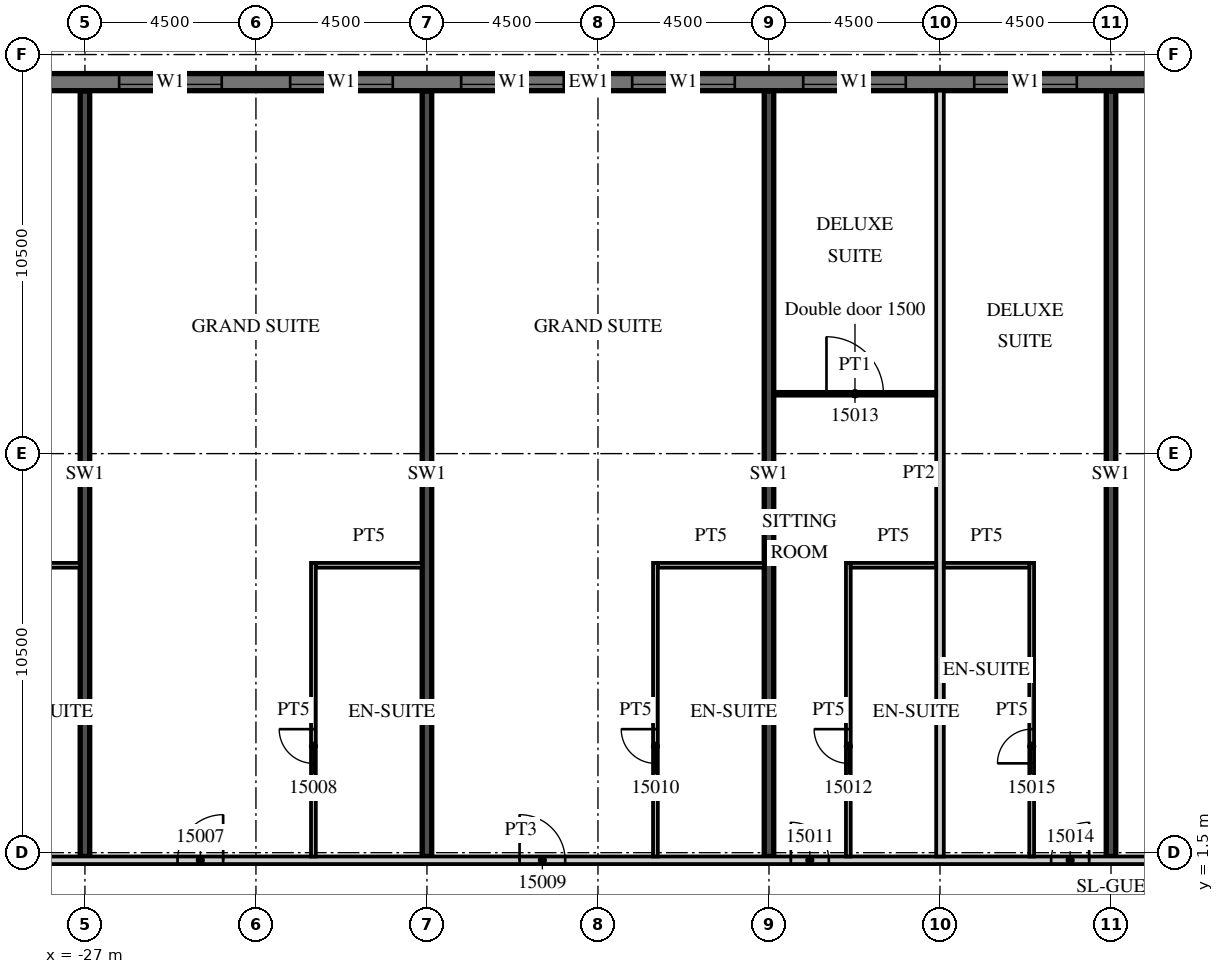
"""IFC4 building model, lengths in metres.
Left out: names, types, materials, properties, quantities, classifications, styles, units other than length and angle.
Written with IfcOpenShell. Run it as: python <this file> out.ifc"""

import sys

from ifc_helpers import new_model, si_unit, direction, frame, frame_2d, origin, place, context, subcontext, project, spatial, rectangle, extrude, element, fill, save


model = new_model("IFC4")
c1 = context("Model", 3, precision=1e-05, world=origin(), true_north=direction((0.0, 1.0)))
c2 = subcontext(c1, "Body", "Model", "MODEL_VIEW")
j1 = project(units=[si_unit("LENGTHUNIT", "METRE"), si_unit("PLANEANGLEUNIT", "RADIAN")], contexts=[c1])
p1 = place(None, origin())
s1 = spatial("IfcSite", under=j1, at=p1, CompositionType="ELEMENT")
p2 = place(p1, origin())
s2 = spatial("IfcBuilding", under=s1, at=p2, CompositionType="ELEMENT")
p3 = place(p2, frame((0.0, 0.0, 79.8)))
s3 = spatial("IfcBuildingStorey", under=s2, at=p3, CompositionType="ELEMENT", Elevation=79.8)
for number, where, z_axis, x_axis in (
    (1, (-27.0, 1.4, 0.0), (0.0, 0.0, 1.0), (0.0, 1.0, 0.0)),
    (2, (-18.0, 1.4, 0.0), (0.0, 0.0, 1.0), (0.0, 1.0, 0.0)),
    (3, (-9.0, 1.4, 0.0), (0.0, 0.0, 1.0), (0.0, 1.0, 0.0)),
    (4, (0.0, 1.4, 0.0), (0.0, 0.0, 1.0), (0.0, 1.0, 0.0)),
):
    element("IfcWall", number, at=place(p3, frame(where, z_axis=z_axis, x_axis=x_axis)), inside=s3, PredefinedType="SHEAR", context=c2, shape_type="SweptSolid", body=[
        extrude(rectangle(XDim=20.14, YDim=0.25, at=frame_2d((10.07, 0.0))), origin(), (0.0, 0.0, 1.0), 3.3),
    ])
p4 = place(p3, frame((13.5, 21.775, 0.0), z_axis=(0.0, 0.0, 1.0), x_axis=(-1.0, 0.0, 0.0)))
e5 = element("IfcWall", 5, at=p4, inside=s3, PredefinedType="SOLIDWALL", context=c2, shape_type="SweptSolid", body=[
    extrude(rectangle(XDim=54.5, YDim=0.45, at=frame_2d((27.25, 0.0))), origin(), (0.0, 0.0, 1.0), 3.02),
])
p5 = place(p4, frame((0.9, 0.0, 0.45)))
e6 = element("IfcOpeningElement", 6, at=p5, cuts=e5, PredefinedType="OPENING", context=c2, shape_type="SweptSolid", body=[
    extrude(rectangle(XDim=2.7, YDim=2.25, at=frame_2d((1.35, 1.125))), frame((0.0, 0.235, 0.0), z_axis=(0.0, -1.0, 0.0), x_axis=(1.0, 0.0, 0.0)), (0.0, 0.0, 1.0), 0.47),
])
p6 = place(p4, frame((5.4, 0.0, 0.45)))
e7 = element("IfcOpeningElement", 7, at=p6, cuts=e5, PredefinedType="OPENING", context=c2, shape_type="SweptSolid", body=[
    extrude(rectangle(XDim=2.7, YDim=2.25, at=frame_2d((1.35, 1.125))), frame((0.0, 0.235, 0.0), z_axis=(0.0, -1.0, 0.0), x_axis=(1.0, 0.0, 0.0)), (0.0, 0.0, 1.0), 0.47),
])
p7 = place(p4, frame((9.9, 0.0, 0.45)))
e8 = element("IfcOpeningElement", 8, at=p7, cuts=e5, PredefinedType="OPENING", context=c2, shape_type="SweptSolid", body=[
    extrude(rectangle(XDim=2.7, YDim=2.25, at=frame_2d((1.35, 1.125))), frame((0.0, 0.235, 0.0), z_axis=(0.0, -1.0, 0.0), x_axis=(1.0, 0.0, 0.0)), (0.0, 0.0, 1.0), 0.47),
])
p8 = place(p4, frame((14.4, 0.0, 0.45)))
e9 = element("IfcOpeningElement", 9, at=p8, cuts=e5, PredefinedType="OPENING", context=c2, shape_type="SweptSolid", body=[
    extrude(rectangle(XDim=2.7, YDim=2.25, at=frame_2d((1.35, 1.125))), frame((0.0, 0.235, 0.0), z_axis=(0.0, -1.0, 0.0), x_axis=(1.0, 0.0, 0.0)), (0.0, 0.0, 1.0), 0.47),
])
p9 = place(p4, frame((18.9, 0.0, 0.45)))
e10 = element("IfcOpeningElement", 10, at=p9, cuts=e5, PredefinedType="OPENING", context=c2, shape_type="SweptSolid", body=[
    extrude(rectangle(XDim=2.7, YDim=2.25, at=frame_2d((1.35, 1.125))), frame((0.0, 0.235, 0.0), z_axis=(0.0, -1.0, 0.0), x_axis=(1.0, 0.0, 0.0)), (0.0, 0.0, 1.0), 0.47),
])
p10 = place(p4, frame((23.4, 0.0, 0.45)))
e11 = element("IfcOpeningElement", 11, at=p10, cuts=e5, PredefinedType="OPENING", context=c2, shape_type="SweptSolid", body=[
    extrude(rectangle(XDim=2.7, YDim=2.25, at=frame_2d((1.35, 1.125))), frame((0.0, 0.235, 0.0), z_axis=(0.0, -1.0, 0.0), x_axis=(1.0, 0.0, 0.0)), (0.0, 0.0, 1.0), 0.47),
])
p11 = place(p4, frame((27.9, 0.0, 0.45)))
e12 = element("IfcOpeningElement", 12, at=p11, cuts=e5, PredefinedType="OPENING", context=c2, shape_type="SweptSolid", body=[
    extrude(rectangle(XDim=2.7, YDim=2.25, at=frame_2d((1.35, 1.125))), frame((0.0, 0.235, 0.0), z_axis=(0.0, -1.0, 0.0), x_axis=(1.0, 0.0, 0.0)), (0.0, 0.0, 1.0), 0.47),
])
p12 = place(p4, frame((32.4, 0.0, 0.45)))
e13 = element("IfcOpeningElement", 13, at=p12, cuts=e5, PredefinedType="OPENING", context=c2, shape_type="SweptSolid", body=[
    extrude(rectangle(XDim=2.7, YDim=2.25, at=frame_2d((1.35, 1.125))), frame((0.0, 0.235, 0.0), z_axis=(0.0, -1.0, 0.0), x_axis=(1.0, 0.0, 0.0)), (0.0, 0.0, 1.0), 0.47),
])
p13 = place(p4, frame((36.9, 0.0, 0.45)))
e14 = element("IfcOpeningElement", 14, at=p13, cuts=e5, PredefinedType="OPENING", context=c2, shape_type="SweptSolid", body=[
    extrude(rectangle(XDim=2.7, YDim=2.25, at=frame_2d((1.35, 1.125))), frame((0.0, 0.235, 0.0), z_axis=(0.0, -1.0, 0.0), x_axis=(1.0, 0.0, 0.0)), (0.0, 0.0, 1.0), 0.47),
])
p14 = place(p4, frame((41.4, 0.0, 0.45)))
e15 = element("IfcOpeningElement", 15, at=p14, cuts=e5, PredefinedType="OPENING", context=c2, shape_type="SweptSolid", body=[
    extrude(rectangle(XDim=2.7, YDim=2.25, at=frame_2d((1.35, 1.125))), frame((0.0, 0.235, 0.0), z_axis=(0.0, -1.0, 0.0), x_axis=(1.0, 0.0, 0.0)), (0.0, 0.0, 1.0), 0.47),
])
p15 = place(p4, frame((45.9, 0.0, 0.45)))
e16 = element("IfcOpeningElement", 16, at=p15, cuts=e5, PredefinedType="OPENING", context=c2, shape_type="SweptSolid", body=[
    extrude(rectangle(XDim=2.7, YDim=2.25, at=frame_2d((1.35, 1.125))), frame((0.0, 0.235, 0.0), z_axis=(0.0, -1.0, 0.0), x_axis=(1.0, 0.0, 0.0)), (0.0, 0.0, 1.0), 0.47),
])
p16 = place(p4, frame((50.4, 0.0, 0.45)))
e17 = element("IfcOpeningElement", 17, at=p16, cuts=e5, PredefinedType="OPENING", context=c2, shape_type="SweptSolid", body=[
    extrude(rectangle(XDim=2.7, YDim=2.25, at=frame_2d((1.35, 1.125))), frame((0.0, 0.235, 0.0), z_axis=(0.0, -1.0, 0.0), x_axis=(1.0, 0.0, 0.0)), (0.0, 0.0, 1.0), 0.47),
])
p17 = place(p3, frame((-44.55, 1.3, 0.0), z_axis=(0.0, 0.0, 1.0), x_axis=(1.0, 0.0, 0.0)))
e18 = element("IfcWall", 18, at=p17, inside=s3, PredefinedType="PARTITIONING", context=c2, shape_type="SweptSolid", body=[
    extrude(rectangle(XDim=58.05, YDim=0.2, at=frame_2d((29.025, 0.0))), origin(), (0.0, 0.0, 1.0), 3.02),
])
p18 = place(p17, frame((0.525, 0.0, 0.0)))
e19 = element("IfcOpeningElement", 19, at=p18, cuts=e18, PredefinedType="OPENING", context=c2, shape_type="SweptSolid", body=[
    extrude(rectangle(XDim=1.0, YDim=2.1, at=frame_2d((0.5, 1.05))), frame((0.0, 0.11, 0.0), z_axis=(0.0, -1.0, 0.0), x_axis=(1.0, 0.0, 0.0)), (0.0, 0.0, 1.0), 0.22),
])
p19 = place(p17, frame((4.625, 0.0, 0.0)))
e20 = element("IfcOpeningElement", 20, at=p19, cuts=e18, PredefinedType="OPENING", context=c2, shape_type="SweptSolid", body=[
    extrude(rectangle(XDim=1.0, YDim=2.1, at=frame_2d((0.5, 1.05))), frame((0.0, 0.11, 0.0), z_axis=(0.0, -1.0, 0.0), x_axis=(1.0, 0.0, 0.0)), (0.0, 0.0, 1.0), 0.22),
])
p20 = place(p17, frame((10.987, 0.0, 0.0)))
e21 = element("IfcOpeningElement", 21, at=p20, cuts=e18, PredefinedType="OPENING", context=c2, shape_type="SweptSolid", body=[
    extrude(rectangle(XDim=1.2, YDim=2.1, at=frame_2d((0.6, 1.05))), frame((0.0, 0.11, 0.0), z_axis=(0.0, -1.0, 0.0), x_axis=(1.0, 0.0, 0.0)), (0.0, 0.0, 1.0), 0.22),
])
p21 = place(p17, frame((19.987, 0.0, 0.0)))
e22 = element("IfcOpeningElement", 22, at=p21, cuts=e18, PredefinedType="OPENING", context=c2, shape_type="SweptSolid", body=[
    extrude(rectangle(XDim=1.2, YDim=2.1, at=frame_2d((0.6, 1.05))), frame((0.0, 0.11, 0.0), z_axis=(0.0, -1.0, 0.0), x_axis=(1.0, 0.0, 0.0)), (0.0, 0.0, 1.0), 0.22),
])
p22 = place(p17, frame((28.987, 0.0, 0.0)))
e23 = element("IfcOpeningElement", 23, at=p22, cuts=e18, PredefinedType="OPENING", context=c2, shape_type="SweptSolid", body=[
    extrude(rectangle(XDim=1.2, YDim=2.1, at=frame_2d((0.6, 1.05))), frame((0.0, 0.11, 0.0), z_axis=(0.0, -1.0, 0.0), x_axis=(1.0, 0.0, 0.0)), (0.0, 0.0, 1.0), 0.22),
])
p23 = place(p17, frame((36.125, 0.0, 0.0)))
e24 = element("IfcOpeningElement", 24, at=p23, cuts=e18, PredefinedType="OPENING", context=c2, shape_type="SweptSolid", body=[
    extrude(rectangle(XDim=1.0, YDim=2.1, at=frame_2d((0.5, 1.05))), frame((0.0, 0.11, 0.0), z_axis=(0.0, -1.0, 0.0), x_axis=(1.0, 0.0, 0.0)), (0.0, 0.0, 1.0), 0.22),
])
p24 = place(p17, frame((42.975, 0.0, 0.0)))
e25 = element("IfcOpeningElement", 25, at=p24, cuts=e18, PredefinedType="OPENING", context=c2, shape_type="SweptSolid", body=[
    extrude(rectangle(XDim=1.0, YDim=2.1, at=frame_2d((0.5, 1.05))), frame((0.0, 0.11, 0.0), z_axis=(0.0, -1.0, 0.0), x_axis=(1.0, 0.0, 0.0)), (0.0, 0.0, 1.0), 0.22),
])
p25 = place(p17, frame((46.987, 0.0, 0.0)))
e26 = element("IfcOpeningElement", 26, at=p25, cuts=e18, PredefinedType="OPENING", context=c2, shape_type="SweptSolid", body=[
    extrude(rectangle(XDim=1.2, YDim=2.1, at=frame_2d((0.6, 1.05))), frame((0.0, 0.11, 0.0), z_axis=(0.0, -1.0, 0.0), x_axis=(1.0, 0.0, 0.0)), (0.0, 0.0, 1.0), 0.22),
])
p26 = place(p17, frame((56.475, 0.0, 0.0)))
e27 = element("IfcOpeningElement", 27, at=p26, cuts=e18, PredefinedType="OPENING", context=c2, shape_type="SweptSolid", body=[
    extrude(rectangle(XDim=1.0, YDim=2.1, at=frame_2d((0.5, 1.05))), frame((0.0, 0.11, 0.0), z_axis=(0.0, -1.0, 0.0), x_axis=(1.0, 0.0, 0.0)), (0.0, 0.0, 1.0), 0.22),
])
p27 = place(p3, frame((-29.925, 9.062, 0.0), z_axis=(0.0, 0.0, 1.0), x_axis=(1.0, 0.0, 0.0)))
e28 = element("IfcWall", 28, at=p27, inside=s3, PredefinedType="PARTITIONING", context=c2, shape_type="SweptSolid", body=[
    extrude(rectangle(XDim=2.8, YDim=0.125, at=frame_2d((1.4, 0.0))), origin(), (0.0, 0.0, 1.0), 3.02),
])
p28 = place(p3, frame((-20.988, 1.4, 0.0), z_axis=(0.0, 0.0, 1.0), x_axis=(0.0, 1.0, 0.0)))
e29 = element("IfcWall", 29, at=p28, inside=s3, PredefinedType="PARTITIONING", context=c2, shape_type="SweptSolid", body=[
    extrude(rectangle(XDim=7.725, YDim=0.125, at=frame_2d((3.863, 0.0))), origin(), (0.0, 0.0, 1.0), 3.02),
])
p29 = place(p28, frame((2.45, 0.0, 0.0)))
e30 = element("IfcOpeningElement", 30, at=p29, cuts=e29, PredefinedType="OPENING", context=c2, shape_type="SweptSolid", body=[
    extrude(rectangle(XDim=0.9, YDim=2.1, at=frame_2d((0.45, 1.05))), frame((0.0, 0.073, 0.0), z_axis=(0.0, -1.0, 0.0), x_axis=(1.0, 0.0, 0.0)), (0.0, 0.0, 1.0), 0.145),
])
p30 = place(p3, frame((-20.925, 9.062, 0.0), z_axis=(0.0, 0.0, 1.0), x_axis=(1.0, 0.0, 0.0)))
e31 = element("IfcWall", 31, at=p30, inside=s3, PredefinedType="PARTITIONING", context=c2, shape_type="SweptSolid", body=[
    extrude(rectangle(XDim=2.8, YDim=0.125, at=frame_2d((1.4, 0.0))), origin(), (0.0, 0.0, 1.0), 3.02),
])
p31 = place(p3, frame((-11.988, 1.4, 0.0), z_axis=(0.0, 0.0, 1.0), x_axis=(0.0, 1.0, 0.0)))
e32 = element("IfcWall", 32, at=p31, inside=s3, PredefinedType="PARTITIONING", context=c2, shape_type="SweptSolid", body=[
    extrude(rectangle(XDim=7.725, YDim=0.125, at=frame_2d((3.863, 0.0))), origin(), (0.0, 0.0, 1.0), 3.02),
])
p32 = place(p31, frame((2.45, 0.0, 0.0)))
e33 = element("IfcOpeningElement", 33, at=p32, cuts=e32, PredefinedType="OPENING", context=c2, shape_type="SweptSolid", body=[
    extrude(rectangle(XDim=0.9, YDim=2.1, at=frame_2d((0.45, 1.05))), frame((0.0, 0.073, 0.0), z_axis=(0.0, -1.0, 0.0), x_axis=(1.0, 0.0, 0.0)), (0.0, 0.0, 1.0), 0.145),
])
p33 = place(p3, frame((-11.925, 9.062, 0.0), z_axis=(0.0, 0.0, 1.0), x_axis=(1.0, 0.0, 0.0)))
e34 = element("IfcWall", 34, at=p33, inside=s3, PredefinedType="PARTITIONING", context=c2, shape_type="SweptSolid", body=[
    extrude(rectangle(XDim=2.8, YDim=0.125, at=frame_2d((1.4, 0.0))), origin(), (0.0, 0.0, 1.0), 3.02),
])
p34 = place(p3, frame((-4.5, 1.4, 0.0), z_axis=(0.0, 0.0, 1.0), x_axis=(0.0, 1.0, 0.0)))
e35 = element("IfcWall", 35, at=p34, inside=s3, PredefinedType="PARTITIONING", context=c2, shape_type="SweptSolid", body=[
    extrude(rectangle(XDim=20.15, YDim=0.2, at=frame_2d((10.075, 0.0))), origin(), (0.0, 0.0, 1.0), 3.02),
])
p35 = place(p3, frame((-6.912, 1.4, 0.0), z_axis=(0.0, 0.0, 1.0), x_axis=(0.0, 1.0, 0.0)))
e36 = element("IfcWall", 36, at=p35, inside=s3, PredefinedType="PARTITIONING", context=c2, shape_type="SweptSolid", body=[
    extrude(rectangle(XDim=7.725, YDim=0.125, at=frame_2d((3.863, 0.0))), origin(), (0.0, 0.0, 1.0), 3.02),
])
p36 = place(p35, frame((2.45, 0.0, 0.0)))
e37 = element("IfcOpeningElement", 37, at=p36, cuts=e36, PredefinedType="OPENING", context=c2, shape_type="SweptSolid", body=[
    extrude(rectangle(XDim=0.9, YDim=2.1, at=frame_2d((0.45, 1.05))), frame((0.0, 0.073, 0.0), z_axis=(0.0, -1.0, 0.0), x_axis=(1.0, 0.0, 0.0)), (0.0, 0.0, 1.0), 0.145),
])
p37 = place(p3, frame((-6.85, 9.062, 0.0), z_axis=(0.0, 0.0, 1.0), x_axis=(1.0, 0.0, 0.0)))
e38 = element("IfcWall", 38, at=p37, inside=s3, PredefinedType="PARTITIONING", context=c2, shape_type="SweptSolid", body=[
    extrude(rectangle(XDim=2.25, YDim=0.125, at=frame_2d((1.125, 0.0))), origin(), (0.0, 0.0, 1.0), 3.02),
])
p38 = place(p3, frame((-8.875, 13.575, 0.0), z_axis=(0.0, 0.0, 1.0), x_axis=(1.0, 0.0, 0.0)))
e39 = element("IfcWall", 39, at=p38, inside=s3, PredefinedType="PARTITIONING", context=c2, shape_type="SweptSolid", body=[
    extrude(rectangle(XDim=4.275, YDim=0.1, at=frame_2d((2.137, 0.0))), origin(), (0.0, 0.0, 1.0), 3.02),
])
p39 = place(p38, frame((1.388, 0.0, 0.0)))
e40 = element("IfcOpeningElement", 40, at=p39, cuts=e39, PredefinedType="OPENING", context=c2, shape_type="SweptSolid", body=[
    extrude(rectangle(XDim=1.5, YDim=2.1, at=frame_2d((0.75, 1.05))), frame((0.0, 0.06, 0.0), z_axis=(0.0, -1.0, 0.0), x_axis=(1.0, 0.0, 0.0)), (0.0, 0.0, 1.0), 0.12),
])
p40 = place(p3, frame((-2.087, 1.4, 0.0), z_axis=(0.0, 0.0, 1.0), x_axis=(0.0, 1.0, 0.0)))
e41 = element("IfcWall", 41, at=p40, inside=s3, PredefinedType="PARTITIONING", context=c2, shape_type="SweptSolid", body=[
    extrude(rectangle(XDim=7.725, YDim=0.125, at=frame_2d((3.863, 0.0))), origin(), (0.0, 0.0, 1.0), 3.02),
])
p41 = place(p40, frame((2.45, 0.0, 0.0)))
e42 = element("IfcOpeningElement", 42, at=p41, cuts=e41, PredefinedType="OPENING", context=c2, shape_type="SweptSolid", body=[
    extrude(rectangle(XDim=0.9, YDim=2.1, at=frame_2d((0.45, 1.05))), frame((0.0, 0.073, 0.0), z_axis=(0.0, -1.0, 0.0), x_axis=(1.0, 0.0, 0.0)), (0.0, 0.0, 1.0), 0.145),
])
p42 = place(p3, frame((-4.4, 9.062, 0.0), z_axis=(0.0, 0.0, 1.0), x_axis=(1.0, 0.0, 0.0)))
e43 = element("IfcWall", 43, at=p42, inside=s3, PredefinedType="PARTITIONING", context=c2, shape_type="SweptSolid", body=[
    extrude(rectangle(XDim=2.25, YDim=0.125, at=frame_2d((1.125, 0.0))), origin(), (0.0, 0.0, 1.0), 3.02),
])
p43 = place(p8, origin())
e44 = element("IfcWindow", 44, at=p43, inside=s3, PartitioningType="SINGLE_PANEL", PredefinedType="WINDOW", context=c2, shape_type="SweptSolid", body=[
    extrude(rectangle(XDim=2.7, YDim=2.25, at=frame_2d((1.35, 1.125))), frame((0.0, 0.09, 0.0), z_axis=(0.0, -1.0, 0.0), x_axis=(1.0, 0.0, 0.0)), (0.0, 0.0, 1.0), 0.06),
])
fill(e9, e44)
p44 = place(p9, origin())
e45 = element("IfcWindow", 45, at=p44, inside=s3, PartitioningType="SINGLE_PANEL", PredefinedType="WINDOW", context=c2, shape_type="SweptSolid", body=[
    extrude(rectangle(XDim=2.7, YDim=2.25, at=frame_2d((1.35, 1.125))), frame((0.0, 0.09, 0.0), z_axis=(0.0, -1.0, 0.0), x_axis=(1.0, 0.0, 0.0)), (0.0, 0.0, 1.0), 0.06),
])
fill(e10, e45)
p45 = place(p10, origin())
e46 = element("IfcWindow", 46, at=p45, inside=s3, PartitioningType="SINGLE_PANEL", PredefinedType="WINDOW", context=c2, shape_type="SweptSolid", body=[
    extrude(rectangle(XDim=2.7, YDim=2.25, at=frame_2d((1.35, 1.125))), frame((0.0, 0.09, 0.0), z_axis=(0.0, -1.0, 0.0), x_axis=(1.0, 0.0, 0.0)), (0.0, 0.0, 1.0), 0.06),
])
fill(e11, e46)
p46 = place(p11, origin())
e47 = element("IfcWindow", 47, at=p46, inside=s3, PartitioningType="SINGLE_PANEL", PredefinedType="WINDOW", context=c2, shape_type="SweptSolid", body=[
    extrude(rectangle(XDim=2.7, YDim=2.25, at=frame_2d((1.35, 1.125))), frame((0.0, 0.09, 0.0), z_axis=(0.0, -1.0, 0.0), x_axis=(1.0, 0.0, 0.0)), (0.0, 0.0, 1.0), 0.06),
])
fill(e12, e47)
p47 = place(p12, origin())
e48 = element("IfcWindow", 48, at=p47, inside=s3, PartitioningType="SINGLE_PANEL", PredefinedType="WINDOW", context=c2, shape_type="SweptSolid", body=[
    extrude(rectangle(XDim=2.7, YDim=2.25, at=frame_2d((1.35, 1.125))), frame((0.0, 0.09, 0.0), z_axis=(0.0, -1.0, 0.0), x_axis=(1.0, 0.0, 0.0)), (0.0, 0.0, 1.0), 0.06),
])
fill(e13, e48)
p48 = place(p13, origin())
e49 = element("IfcWindow", 49, at=p48, inside=s3, PartitioningType="SINGLE_PANEL", PredefinedType="WINDOW", context=c2, shape_type="SweptSolid", body=[
    extrude(rectangle(XDim=2.7, YDim=2.25, at=frame_2d((1.35, 1.125))), frame((0.0, 0.09, 0.0), z_axis=(0.0, -1.0, 0.0), x_axis=(1.0, 0.0, 0.0)), (0.0, 0.0, 1.0), 0.06),
])
fill(e14, e49)
p49 = place(p21, origin())
e50 = element("IfcDoor", 50, at=p49, inside=s3, OperationType="SINGLE_SWING_RIGHT", PredefinedType="DOOR", context=c2, shape_type="SweptSolid", body=[
    extrude(rectangle(XDim=1.2, YDim=2.1, at=frame_2d((0.6, 1.05))), frame((0.0, 0.025, 0.0), z_axis=(0.0, -1.0, 0.0), x_axis=(1.0, 0.0, 0.0)), (0.0, 0.0, 1.0), 0.05),
])
fill(e22, e50)
p50 = place(p29, origin())
e51 = element("IfcDoor", 51, at=p50, inside=s3, OperationType="SINGLE_SWING_RIGHT", PredefinedType="DOOR", context=c2, shape_type="SweptSolid", body=[
    extrude(rectangle(XDim=0.9, YDim=2.1, at=frame_2d((0.45, 1.05))), frame((0.0, 0.025, 0.0), z_axis=(0.0, -1.0, 0.0), x_axis=(1.0, 0.0, 0.0)), (0.0, 0.0, 1.0), 0.05),
])
fill(e30, e51)
p51 = place(p22, origin())
e52 = element("IfcDoor", 52, at=p51, inside=s3, OperationType="SINGLE_SWING_LEFT", PredefinedType="DOOR", context=c2, shape_type="SweptSolid", body=[
    extrude(rectangle(XDim=1.2, YDim=2.1, at=frame_2d((0.6, 1.05))), frame((0.0, 0.025, 0.0), z_axis=(0.0, -1.0, 0.0), x_axis=(1.0, 0.0, 0.0)), (0.0, 0.0, 1.0), 0.05),
])
fill(e23, e52)
p52 = place(p32, origin())
e53 = element("IfcDoor", 53, at=p52, inside=s3, OperationType="SINGLE_SWING_RIGHT", PredefinedType="DOOR", context=c2, shape_type="SweptSolid", body=[
    extrude(rectangle(XDim=0.9, YDim=2.1, at=frame_2d((0.45, 1.05))), frame((0.0, 0.025, 0.0), z_axis=(0.0, -1.0, 0.0), x_axis=(1.0, 0.0, 0.0)), (0.0, 0.0, 1.0), 0.05),
])
fill(e33, e53)
p53 = place(p23, origin())
e54 = element("IfcDoor", 54, at=p53, inside=s3, OperationType="SINGLE_SWING_LEFT", PredefinedType="DOOR", context=c2, shape_type="SweptSolid", body=[
    extrude(rectangle(XDim=1.0, YDim=2.1, at=frame_2d((0.5, 1.05))), frame((0.0, 0.025, 0.0), z_axis=(0.0, -1.0, 0.0), x_axis=(1.0, 0.0, 0.0)), (0.0, 0.0, 1.0), 0.05),
])
fill(e24, e54)
p54 = place(p36, origin())
e55 = element("IfcDoor", 55, at=p54, inside=s3, OperationType="SINGLE_SWING_RIGHT", PredefinedType="DOOR", context=c2, shape_type="SweptSolid", body=[
    extrude(rectangle(XDim=0.9, YDim=2.1, at=frame_2d((0.45, 1.05))), frame((0.0, 0.025, 0.0), z_axis=(0.0, -1.0, 0.0), x_axis=(1.0, 0.0, 0.0)), (0.0, 0.0, 1.0), 0.05),
])
fill(e37, e55)
p55 = place(p39, origin())
e56 = element("IfcDoor", 56, at=p55, inside=s3, OperationType="SINGLE_SWING_LEFT", PredefinedType="DOOR", context=c2, shape_type="SweptSolid", body=[
    extrude(rectangle(XDim=1.5, YDim=2.1, at=frame_2d((0.75, 1.05))), frame((0.0, 0.025, 0.0), z_axis=(0.0, -1.0, 0.0), x_axis=(1.0, 0.0, 0.0)), (0.0, 0.0, 1.0), 0.05),
])
fill(e40, e56)
p56 = place(p24, origin())
e57 = element("IfcDoor", 57, at=p56, inside=s3, OperationType="SINGLE_SWING_RIGHT", PredefinedType="DOOR", context=c2, shape_type="SweptSolid", body=[
    extrude(rectangle(XDim=1.0, YDim=2.1, at=frame_2d((0.5, 1.05))), frame((0.0, 0.025, 0.0), z_axis=(0.0, -1.0, 0.0), x_axis=(1.0, 0.0, 0.0)), (0.0, 0.0, 1.0), 0.05),
])
fill(e25, e57)
p57 = place(p41, origin())
e58 = element("IfcDoor", 58, at=p57, inside=s3, OperationType="SINGLE_SWING_LEFT", PredefinedType="DOOR", context=c2, shape_type="SweptSolid", body=[
    extrude(rectangle(XDim=0.9, YDim=2.1, at=frame_2d((0.45, 1.05))), frame((0.0, 0.025, 0.0), z_axis=(0.0, -1.0, 0.0), x_axis=(1.0, 0.0, 0.0)), (0.0, 0.0, 1.0), 0.05),
])
fill(e42, e58)
save(model, sys.argv[1])
